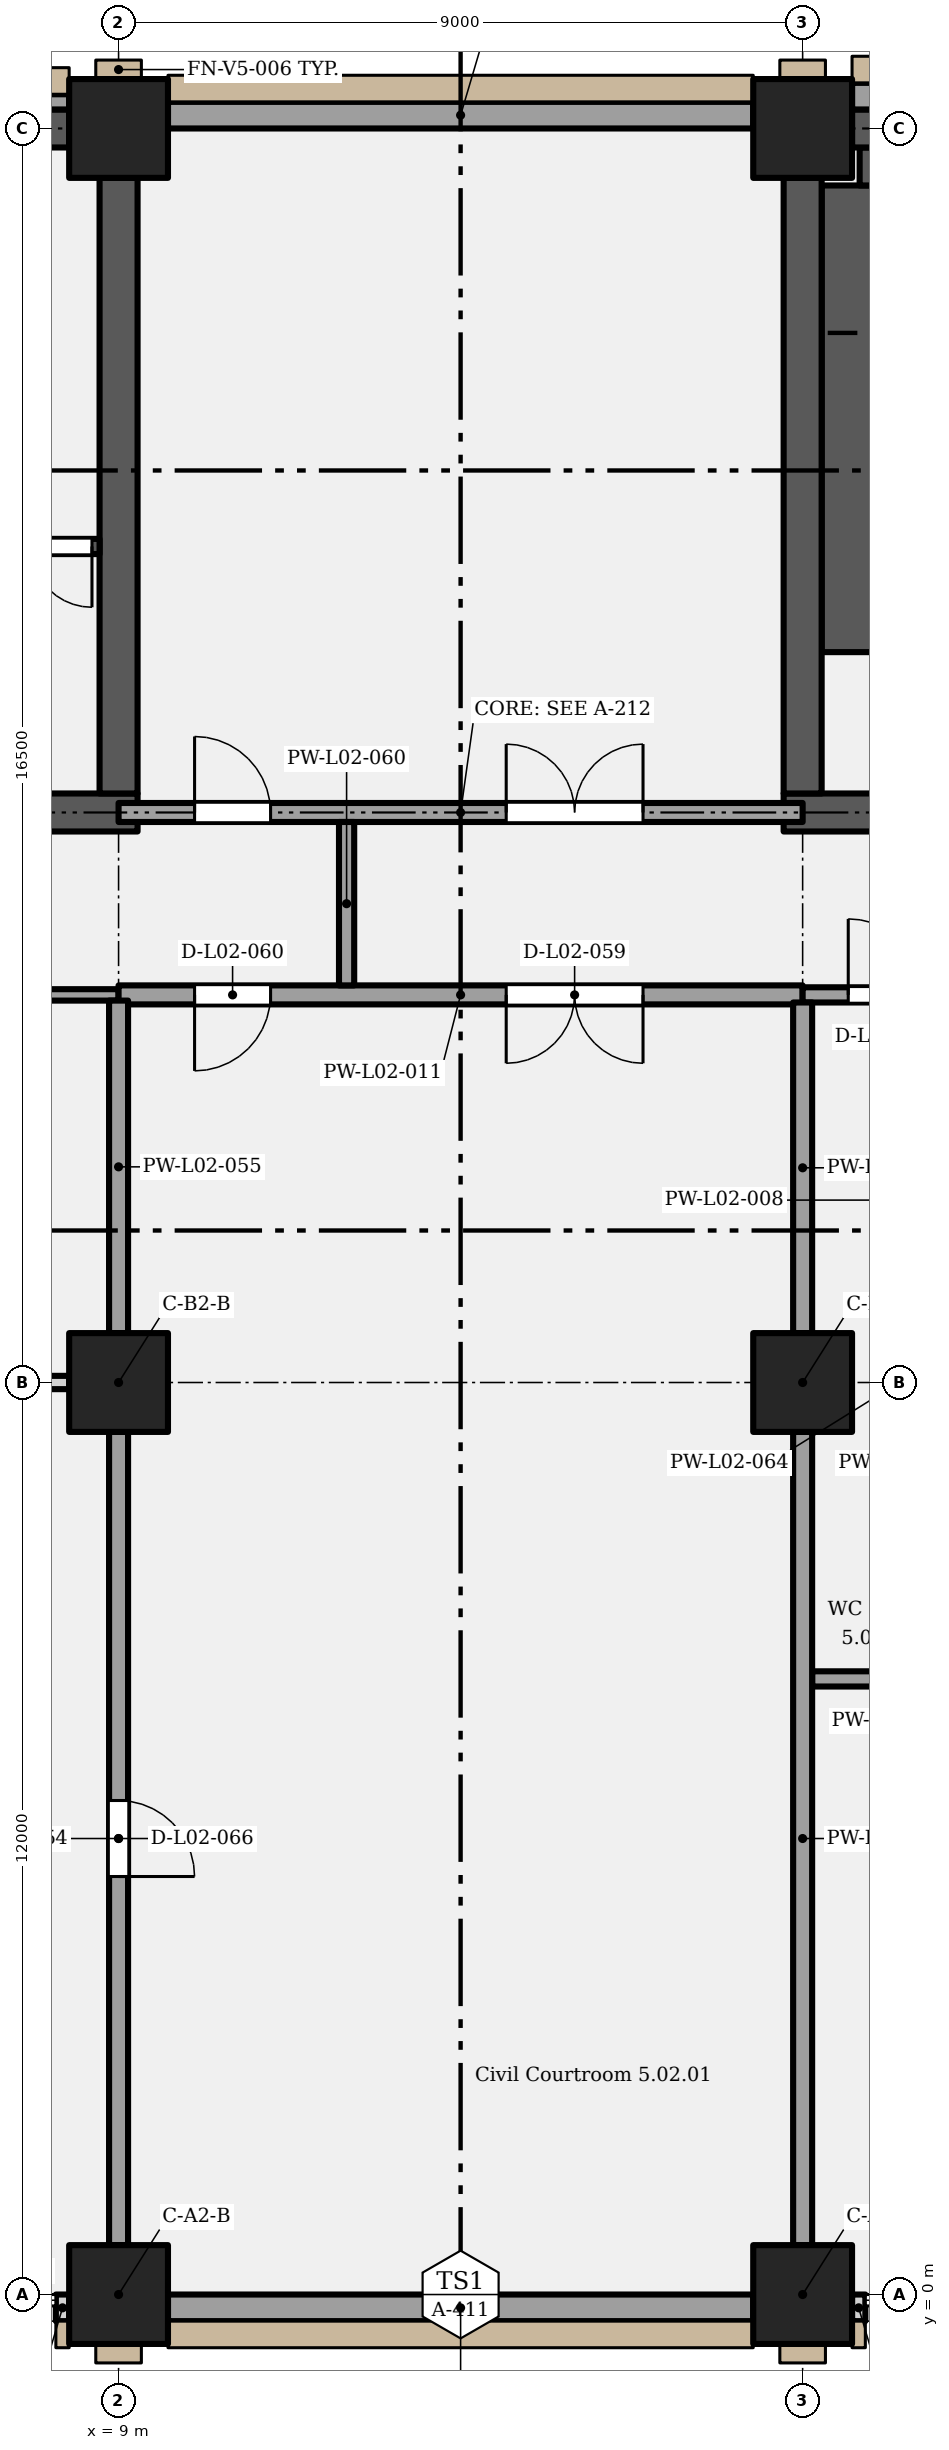
"""IFC4 building model, lengths in metres.
Left out: names, types, materials, properties, quantities, classifications, styles, units other than length and angle.
Written with IfcOpenShell. Run it as: python <this file> out.ifc"""

import sys

from ifc_helpers import new_model, si_unit, direction, frame, frame_2d, origin, origin_2d, place, context, subcontext, project, spatial, rectangle, extrude, element, fill, save


model = new_model("IFC4")
c1 = context("Model", 3, precision=1e-05, world=origin(), true_north=direction((0.0, 1.0)))
c2 = subcontext(c1, "Body", "Model", "MODEL_VIEW")
j1 = project(units=[si_unit("LENGTHUNIT", "METRE"), si_unit("PLANEANGLEUNIT", "RADIAN")], contexts=[c1])
p1 = place(None, origin())
s1 = spatial("IfcSite", under=j1, at=p1, CompositionType="ELEMENT")
p2 = place(p1, origin())
s2 = spatial("IfcBuilding", under=s1, at=p2, CompositionType="ELEMENT")
p3 = place(p2, frame((0.0, 0.0, 12.0)))
s3 = spatial("IfcBuildingStorey", under=s2, at=p3, CompositionType="ELEMENT", Elevation=12.0)
for number, where, z_axis, x_axis in (
    (1, (9.0, 0.0, 0.0), (0.0, 0.0, 1.0), (1.0, 0.0, 0.0)),
    (2, (18.0, 0.0, 0.0), (0.0, 0.0, 1.0), (1.0, 0.0, 0.0)),
    (3, (9.0, 12.0, 0.0), (0.0, 0.0, 1.0), (1.0, 0.0, 0.0)),
    (4, (18.0, 12.0, 0.0), (0.0, 0.0, 1.0), (1.0, 0.0, 0.0)),
    (5, (9.0, 28.5, 0.0), (0.0, 0.0, 1.0), (1.0, 0.0, 0.0)),
    (6, (18.0, 28.5, 0.0), (0.0, 0.0, 1.0), (1.0, 0.0, 0.0)),
):
    element("IfcColumn", number, at=place(p3, frame(where, z_axis=z_axis, x_axis=x_axis)), inside=s3, PredefinedType="COLUMN", context=c2, shape_type="SweptSolid", body=[
        extrude(rectangle(XDim=1.3, YDim=1.3, at=origin_2d()), origin(), (0.0, 0.0, 1.0), 5.4),
    ])
p4 = place(p3, frame((-0.25, 19.5, 0.0), z_axis=(0.0, 0.0, 1.0), x_axis=(1.0, 0.0, 0.0)))
e7 = element("IfcWall", 7, at=p4, inside=s3, PredefinedType="SHEAR", context=c2, shape_type="SweptSolid", body=[
    extrude(rectangle(XDim=9.5, YDim=0.5, at=frame_2d((4.75, 0.0))), origin(), (0.0, 0.0, 1.0), 5.15),
])
p5 = place(p4, frame((1.9, 0.0, 0.0)))
e8 = element("IfcOpeningElement", 8, at=p5, cuts=e7, PredefinedType="OPENING", context=c2, shape_type="SweptSolid", body=[
    extrude(rectangle(XDim=1.2, YDim=2.1, at=frame_2d((0.6, 1.05))), frame((0.0, 0.26, 0.0), z_axis=(0.0, -1.0, 0.0), x_axis=(1.0, 0.0, 0.0)), (0.0, 0.0, 1.0), 0.52),
])
p6 = place(p4, frame((6.4, 0.0, 0.0)))
e9 = element("IfcOpeningElement", 9, at=p6, cuts=e7, PredefinedType="OPENING", context=c2, shape_type="SweptSolid", body=[
    extrude(rectangle(XDim=1.2, YDim=2.1, at=frame_2d((0.6, 1.05))), frame((0.0, 0.26, 0.0), z_axis=(0.0, -1.0, 0.0), x_axis=(1.0, 0.0, 0.0)), (0.0, 0.0, 1.0), 0.52),
])
p7 = place(p3, frame((17.75, 19.5, 0.0), z_axis=(0.0, 0.0, 1.0), x_axis=(1.0, 0.0, 0.0)))
e10 = element("IfcWall", 10, at=p7, inside=s3, PredefinedType="SHEAR", context=c2, shape_type="SweptSolid", body=[
    extrude(rectangle(XDim=9.5, YDim=0.5, at=frame_2d((4.75, 0.0))), origin(), (0.0, 0.0, 1.0), 5.15),
])
p8 = place(p7, frame((1.9, 0.0, 0.0)))
e11 = element("IfcOpeningElement", 11, at=p8, cuts=e10, PredefinedType="OPENING", context=c2, shape_type="SweptSolid", body=[
    extrude(rectangle(XDim=1.2, YDim=2.1, at=frame_2d((0.6, 1.05))), frame((0.0, 0.26, 0.0), z_axis=(0.0, -1.0, 0.0), x_axis=(1.0, 0.0, 0.0)), (0.0, 0.0, 1.0), 0.52),
])
p9 = place(p7, frame((7.95, 0.0, 0.0), z_axis=(0.0, 0.0, 1.0), x_axis=(-1.0, 0.0, 0.0)))
e12 = element("IfcOpeningElement", 12, at=p9, cuts=e10, PredefinedType="OPENING", context=c2, shape_type="SweptSolid", body=[
    extrude(rectangle(XDim=1.8, YDim=2.1, at=frame_2d((0.9, 1.05))), frame((0.0, 0.26, 0.0), z_axis=(0.0, -1.0, 0.0), x_axis=(1.0, 0.0, 0.0)), (0.0, 0.0, 1.0), 0.52),
])
for number, where, z_axis, x_axis in (
    (13, (9.0, 19.75, 0.0), (0.0, 0.0, 1.0), (0.0, 1.0, 0.0)),
    (14, (18.0, 19.75, 0.0), (0.0, 0.0, 1.0), (0.0, 1.0, 0.0)),
):
    element("IfcWall", number, at=place(p3, frame(where, z_axis=z_axis, x_axis=x_axis)), inside=s3, PredefinedType="SHEAR", context=c2, shape_type="SweptSolid", body=[
        extrude(rectangle(XDim=8.1, YDim=0.5, at=frame_2d((4.05, 0.0))), origin(), (0.0, 0.0, 1.0), 5.15),
    ])
p10 = place(p3, frame((0.45, 28.5, 0.0), z_axis=(0.0, 0.0, 1.0), x_axis=(1.0, 0.0, 0.0)))
e15 = element("IfcWall", 15, at=p10, inside=s3, PredefinedType="SHEAR", context=c2, shape_type="SweptSolid", body=[
    extrude(rectangle(XDim=7.9, YDim=0.5, at=frame_2d((3.95, 0.0))), origin(), (0.0, 0.0, 1.0), 5.15),
])
p11 = place(p3, frame((18.65, 28.5, 0.0), z_axis=(0.0, 0.0, 1.0), x_axis=(1.0, 0.0, 0.0)))
e16 = element("IfcWall", 16, at=p11, inside=s3, PredefinedType="SHEAR", context=c2, shape_type="SweptSolid", body=[
    extrude(rectangle(XDim=7.7, YDim=0.5, at=frame_2d((3.85, 0.0))), origin(), (0.0, 0.0, 1.0), 5.15),
])
p12 = place(p3, frame((8.175, -0.175, 0.0), z_axis=(0.0, 0.0, 1.0), x_axis=(1.0, 0.0, 0.0)))
e17 = element("IfcWall", 17, at=p12, inside=s3, PredefinedType="SOLIDWALL", context=c2, shape_type="SweptSolid", body=[
    extrude(rectangle(XDim=0.175, YDim=0.35, at=frame_2d((0.087, 0.0))), origin(), (0.0, 0.0, 1.0), 5.15),
])
p13 = place(p3, frame((9.65, -0.175, 0.0), z_axis=(0.0, 0.0, 1.0), x_axis=(1.0, 0.0, 0.0)))
e18 = element("IfcWall", 18, at=p13, inside=s3, PredefinedType="SOLIDWALL", context=c2, shape_type="SweptSolid", body=[
    extrude(rectangle(XDim=7.7, YDim=0.35, at=frame_2d((3.85, 0.0))), origin(), (0.0, 0.0, 1.0), 5.15),
])
p14 = place(p3, frame((18.65, -0.175, 0.0), z_axis=(0.0, 0.0, 1.0), x_axis=(1.0, 0.0, 0.0)))
e19 = element("IfcWall", 19, at=p14, inside=s3, PredefinedType="SOLIDWALL", context=c2, shape_type="SweptSolid", body=[
    extrude(rectangle(XDim=0.175, YDim=0.35, at=frame_2d((0.087, 0.0))), origin(), (0.0, 0.0, 1.0), 5.15),
])
p15 = place(p3, frame((0.45, 28.85, 0.0), z_axis=(0.0, 0.0, 1.0), x_axis=(1.0, 0.0, 0.0)))
e20 = element("IfcWall", 20, at=p15, inside=s3, PredefinedType="SOLIDWALL", context=c2, shape_type="SweptSolid", body=[
    extrude(rectangle(XDim=7.9, YDim=0.2, at=frame_2d((3.95, 0.0))), origin(), (0.0, 0.0, 1.0), 5.15),
])
for number, where, z_axis, x_axis in (
    (21, (9.65, 28.675, 0.0), (0.0, 0.0, 1.0), (1.0, 0.0, 0.0)),
    (22, (18.65, 28.925, 0.0), (0.0, 0.0, 1.0), (1.0, 0.0, 0.0)),
):
    element("IfcWall", number, at=place(p3, frame(where, z_axis=z_axis, x_axis=x_axis)), inside=s3, PredefinedType="SOLIDWALL", context=c2, shape_type="SweptSolid", body=[
        extrude(rectangle(XDim=7.7, YDim=0.35, at=frame_2d((3.85, 0.0))), origin(), (0.0, 0.0, 1.0), 5.15),
    ])
p16 = place(p3, frame((18.125, 8.1, 0.0), z_axis=(0.0, 0.0, 1.0), x_axis=(1.0, 0.0, 0.0)))
e23 = element("IfcWall", 23, at=p16, inside=s3, PredefinedType="PARTITIONING", context=c2, shape_type="SweptSolid", body=[
    extrude(rectangle(XDim=2.075, YDim=0.2, at=frame_2d((1.038, 0.0))), origin(), (0.0, 0.0, 1.0), 5.15),
])
p17 = place(p3, frame((4.413, 12.0, 0.0), z_axis=(0.0, 0.0, 1.0), x_axis=(1.0, 0.0, 0.0)))
e24 = element("IfcWall", 24, at=p17, inside=s3, PredefinedType="PARTITIONING", context=c2, shape_type="SweptSolid", body=[
    extrude(rectangle(XDim=3.938, YDim=0.175, at=frame_2d((1.969, 0.0))), origin(), (0.0, 0.0, 1.0), 4.4),
])
p18 = place(p17, frame((1.837, 0.0, 0.0)))
e25 = element("IfcOpeningElement", 25, at=p18, cuts=e24, PredefinedType="OPENING", context=c2, shape_type="SweptSolid", body=[
    extrude(rectangle(XDim=1.0, YDim=2.1, at=frame_2d((0.5, 1.05))), frame((0.0, 0.097, 0.0), z_axis=(0.0, -1.0, 0.0), x_axis=(1.0, 0.0, 0.0)), (0.0, 0.0, 1.0), 0.195),
])
p19 = place(p3, frame((-0.25, 17.1, 0.0), z_axis=(0.0, 0.0, 1.0), x_axis=(1.0, 0.0, 0.0)))
e26 = element("IfcWall", 26, at=p19, inside=s3, PredefinedType="PARTITIONING", context=c2, shape_type="SweptSolid", body=[
    extrude(rectangle(XDim=9.25, YDim=0.15, at=frame_2d((4.625, 0.0))), origin(), (0.0, 0.0, 1.0), 5.15),
])
p20 = place(p19, frame((3.0, 0.0, 0.0), z_axis=(0.0, 0.0, 1.0), x_axis=(-1.0, 0.0, 0.0)))
e27 = element("IfcOpeningElement", 27, at=p20, cuts=e26, PredefinedType="OPENING", context=c2, shape_type="SweptSolid", body=[
    extrude(rectangle(XDim=1.0, YDim=2.1, at=frame_2d((0.5, 1.05))), frame((0.0, 0.085, 0.0), z_axis=(0.0, -1.0, 0.0), x_axis=(1.0, 0.0, 0.0)), (0.0, 0.0, 1.0), 0.17),
])
p21 = place(p19, frame((7.5, 0.0, 0.0), z_axis=(0.0, 0.0, 1.0), x_axis=(-1.0, 0.0, 0.0)))
e28 = element("IfcOpeningElement", 28, at=p21, cuts=e26, PredefinedType="OPENING", context=c2, shape_type="SweptSolid", body=[
    extrude(rectangle(XDim=1.0, YDim=2.1, at=frame_2d((0.5, 1.05))), frame((0.0, 0.085, 0.0), z_axis=(0.0, -1.0, 0.0), x_axis=(1.0, 0.0, 0.0)), (0.0, 0.0, 1.0), 0.17),
])
p22 = place(p3, frame((9.0, 17.1, 0.0), z_axis=(0.0, 0.0, 1.0), x_axis=(1.0, 0.0, 0.0)))
e29 = element("IfcWall", 29, at=p22, inside=s3, PredefinedType="PARTITIONING", context=c2, shape_type="SweptSolid", body=[
    extrude(rectangle(XDim=9.0, YDim=0.25, at=frame_2d((4.5, 0.0))), origin(), (0.0, 0.0, 1.0), 5.15),
])
p23 = place(p22, frame((6.9, 0.0, 0.0), z_axis=(0.0, 0.0, 1.0), x_axis=(-1.0, 0.0, 0.0)))
e30 = element("IfcOpeningElement", 30, at=p23, cuts=e29, PredefinedType="OPENING", context=c2, shape_type="SweptSolid", body=[
    extrude(rectangle(XDim=1.8, YDim=2.4, at=frame_2d((0.9, 1.2))), frame((0.0, 0.135, 0.0), z_axis=(0.0, -1.0, 0.0), x_axis=(1.0, 0.0, 0.0)), (0.0, 0.0, 1.0), 0.27),
])
p24 = place(p22, frame((2.0, 0.0, 0.0), z_axis=(0.0, 0.0, 1.0), x_axis=(-1.0, 0.0, 0.0)))
e31 = element("IfcOpeningElement", 31, at=p24, cuts=e29, PredefinedType="OPENING", context=c2, shape_type="SweptSolid", body=[
    extrude(rectangle(XDim=1.0, YDim=2.1, at=frame_2d((0.5, 1.05))), frame((0.0, 0.135, 0.0), z_axis=(0.0, -1.0, 0.0), x_axis=(1.0, 0.0, 0.0)), (0.0, 0.0, 1.0), 0.27),
])
p25 = place(p3, frame((18.0, 17.1, 0.0), z_axis=(0.0, 0.0, 1.0), x_axis=(1.0, 0.0, 0.0)))
e32 = element("IfcWall", 32, at=p25, inside=s3, PredefinedType="PARTITIONING", context=c2, shape_type="SweptSolid", body=[
    extrude(rectangle(XDim=9.25, YDim=0.2, at=frame_2d((4.625, 0.0))), origin(), (0.0, 0.0, 1.0), 5.15),
])
p26 = place(p25, frame((7.25, 0.0, 0.0), z_axis=(0.0, 0.0, 1.0), x_axis=(-1.0, 0.0, 0.0)))
e33 = element("IfcOpeningElement", 33, at=p26, cuts=e32, PredefinedType="OPENING", context=c2, shape_type="SweptSolid", body=[
    extrude(rectangle(XDim=1.0, YDim=2.1, at=frame_2d((0.5, 1.05))), frame((0.0, 0.11, 0.0), z_axis=(0.0, -1.0, 0.0), x_axis=(1.0, 0.0, 0.0)), (0.0, 0.0, 1.0), 0.22),
])
p27 = place(p25, frame((0.6, 0.0, 0.0)))
e34 = element("IfcOpeningElement", 34, at=p27, cuts=e32, PredefinedType="OPENING", context=c2, shape_type="SweptSolid", body=[
    extrude(rectangle(XDim=1.0, YDim=2.1, at=frame_2d((0.5, 1.05))), frame((0.0, 0.11, 0.0), z_axis=(0.0, -1.0, 0.0), x_axis=(1.0, 0.0, 0.0)), (0.0, 0.0, 1.0), 0.22),
])
p28 = place(p3, frame((9.0, 19.5, 0.0), z_axis=(0.0, 0.0, 1.0), x_axis=(1.0, 0.0, 0.0)))
e35 = element("IfcWall", 35, at=p28, inside=s3, PredefinedType="PARTITIONING", context=c2, shape_type="SweptSolid", body=[
    extrude(rectangle(XDim=9.0, YDim=0.25, at=frame_2d((4.5, 0.0))), origin(), (0.0, 0.0, 1.0), 5.15),
])
p29 = place(p28, frame((5.1, 0.0, 0.0)))
e36 = element("IfcOpeningElement", 36, at=p29, cuts=e35, PredefinedType="OPENING", context=c2, shape_type="SweptSolid", body=[
    extrude(rectangle(XDim=1.8, YDim=2.4, at=frame_2d((0.9, 1.2))), frame((0.0, 0.135, 0.0), z_axis=(0.0, -1.0, 0.0), x_axis=(1.0, 0.0, 0.0)), (0.0, 0.0, 1.0), 0.27),
])
p30 = place(p28, frame((1.0, 0.0, 0.0)))
e37 = element("IfcOpeningElement", 37, at=p30, cuts=e35, PredefinedType="OPENING", context=c2, shape_type="SweptSolid", body=[
    extrude(rectangle(XDim=1.0, YDim=2.1, at=frame_2d((0.5, 1.05))), frame((0.0, 0.135, 0.0), z_axis=(0.0, -1.0, 0.0), x_axis=(1.0, 0.0, 0.0)), (0.0, 0.0, 1.0), 0.27),
])
p31 = place(p3, frame((7.5, 23.0, 0.0), z_axis=(0.0, 0.0, 1.0), x_axis=(1.0, 0.0, 0.0)))
e38 = element("IfcWall", 38, at=p31, inside=s3, PredefinedType="SHEAR", context=c2, shape_type="SweptSolid", body=[
    extrude(rectangle(XDim=1.25, YDim=0.2, at=frame_2d((0.625, 0.0))), origin(), (0.0, 0.0, 1.0), 5.15),
])
p32 = place(p31, frame((1.15, 0.0, 0.0), z_axis=(0.0, 0.0, 1.0), x_axis=(-1.0, 0.0, 0.0)))
e39 = element("IfcOpeningElement", 39, at=p32, cuts=e38, PredefinedType="OPENING", context=c2, shape_type="SweptSolid", body=[
    extrude(rectangle(XDim=0.8, YDim=2.0, at=frame_2d((0.4, 1.0))), frame((0.0, 0.11, 0.0), z_axis=(0.0, -1.0, 0.0), x_axis=(1.0, 0.0, 0.0)), (0.0, 0.0, 1.0), 0.22),
])
p33 = place(p3, frame((9.0, 0.65, 0.0), z_axis=(0.0, 0.0, 1.0), x_axis=(0.0, 1.0, 0.0)))
e40 = element("IfcWall", 40, at=p33, inside=s3, PredefinedType="PARTITIONING", context=c2, shape_type="SweptSolid", body=[
    extrude(rectangle(XDim=10.7, YDim=0.25, at=frame_2d((5.35, 0.0))), origin(), (0.0, 0.0, 1.0), 4.4),
])
p34 = place(p33, frame((5.85, 0.0, 0.0), z_axis=(0.0, 0.0, 1.0), x_axis=(-1.0, 0.0, 0.0)))
e41 = element("IfcOpeningElement", 41, at=p34, cuts=e40, PredefinedType="OPENING", context=c2, shape_type="SweptSolid", body=[
    extrude(rectangle(XDim=1.0, YDim=2.1, at=frame_2d((0.5, 1.05))), frame((0.0, 0.135, 0.0), z_axis=(0.0, -1.0, 0.0), x_axis=(1.0, 0.0, 0.0)), (0.0, 0.0, 1.0), 0.27),
])
p35 = place(p3, frame((9.0, 12.65, 0.0), z_axis=(0.0, 0.0, 1.0), x_axis=(0.0, 1.0, 0.0)))
e42 = element("IfcWall", 42, at=p35, inside=s3, PredefinedType="PARTITIONING", context=c2, shape_type="SweptSolid", body=[
    extrude(rectangle(XDim=4.375, YDim=0.25, at=frame_2d((2.188, 0.0))), origin(), (0.0, 0.0, 1.0), 4.2),
])
p36 = place(p3, frame((12.0, 17.225, 0.0), z_axis=(0.0, 0.0, 1.0), x_axis=(0.0, 1.0, 0.0)))
e43 = element("IfcWall", 43, at=p36, inside=s3, PredefinedType="PARTITIONING", context=c2, shape_type="SweptSolid", body=[
    extrude(rectangle(XDim=2.15, YDim=0.2, at=frame_2d((1.075, 0.0))), origin(), (0.0, 0.0, 1.0), 5.15),
])
p37 = place(p3, frame((18.0, 0.65, 0.0), z_axis=(0.0, 0.0, 1.0), x_axis=(0.0, 1.0, 0.0)))
e44 = element("IfcWall", 44, at=p37, inside=s3, PredefinedType="PARTITIONING", context=c2, shape_type="SweptSolid", body=[
    extrude(rectangle(XDim=10.7, YDim=0.25, at=frame_2d((5.35, 0.0))), origin(), (0.0, 0.0, 1.0), 4.4),
])
p38 = place(p3, frame((18.0, 12.65, 0.0), z_axis=(0.0, 0.0, 1.0), x_axis=(0.0, 1.0, 0.0)))
e45 = element("IfcWall", 45, at=p38, inside=s3, PredefinedType="PARTITIONING", context=c2, shape_type="SweptSolid", body=[
    extrude(rectangle(XDim=4.35, YDim=0.25, at=frame_2d((2.175, 0.0))), origin(), (0.0, 0.0, 1.0), 4.2),
])
p39 = place(p3, frame((18.6, 21.61, 0.0), z_axis=(0.0, 0.0, 1.0), x_axis=(0.0, 1.0, 0.0)))
e46 = element("IfcWall", 46, at=p39, inside=s3, PredefinedType="SHEAR", context=c2, shape_type="SweptSolid", body=[
    extrude(rectangle(XDim=6.14, YDim=0.7, at=frame_2d((3.07, 0.0))), origin(), (0.0, 0.0, 1.0), 2.587),
])
p40 = place(p3, frame((18.85, 27.75, 0.0), z_axis=(0.0, 0.0, 1.0), x_axis=(0.0, 1.0, 0.0)))
e47 = element("IfcWall", 47, at=p40, inside=s3, PredefinedType="SHEAR", context=c2, shape_type="SweptSolid", body=[
    extrude(rectangle(XDim=0.5, YDim=0.2, at=frame_2d((0.25, 0.0))), origin(), (0.0, 0.0, 1.0), 2.587),
])
p41 = place(p32, origin())
e48 = element("IfcDoor", 48, at=p41, inside=s3, OperationType="SINGLE_SWING_LEFT", PredefinedType="DOOR", context=c2, shape_type="SweptSolid", body=[
    extrude(rectangle(XDim=0.8, YDim=2.0, at=frame_2d((0.4, 1.0))), frame((0.0, 0.025, 0.0), z_axis=(0.0, -1.0, 0.0), x_axis=(1.0, 0.0, 0.0)), (0.0, 0.0, 1.0), 0.05),
])
fill(e39, e48)
p42 = place(p23, origin())
e49 = element("IfcDoor", 49, at=p42, inside=s3, OperationType="DOUBLE_DOOR_SINGLE_SWING", PredefinedType="DOOR", context=c2, shape_type="SweptSolid", body=[
    extrude(rectangle(XDim=1.8, YDim=2.4, at=frame_2d((0.9, 1.2))), frame((0.0, 0.025, 0.0), z_axis=(0.0, -1.0, 0.0), x_axis=(1.0, 0.0, 0.0)), (0.0, 0.0, 1.0), 0.05),
])
fill(e30, e49)
p43 = place(p24, origin())
e50 = element("IfcDoor", 50, at=p43, inside=s3, OperationType="SINGLE_SWING_RIGHT", PredefinedType="DOOR", context=c2, shape_type="SweptSolid", body=[
    extrude(rectangle(XDim=1.0, YDim=2.1, at=frame_2d((0.5, 1.05))), frame((0.0, 0.025, 0.0), z_axis=(0.0, -1.0, 0.0), x_axis=(1.0, 0.0, 0.0)), (0.0, 0.0, 1.0), 0.05),
])
fill(e31, e50)
p44 = place(p29, origin())
e51 = element("IfcDoor", 51, at=p44, inside=s3, OperationType="DOUBLE_DOOR_SINGLE_SWING", PredefinedType="DOOR", context=c2, shape_type="SweptSolid", body=[
    extrude(rectangle(XDim=1.8, YDim=2.4, at=frame_2d((0.9, 1.2))), frame((0.0, 0.025, 0.0), z_axis=(0.0, -1.0, 0.0), x_axis=(1.0, 0.0, 0.0)), (0.0, 0.0, 1.0), 0.05),
])
fill(e36, e51)
p45 = place(p30, origin())
e52 = element("IfcDoor", 52, at=p45, inside=s3, OperationType="SINGLE_SWING_LEFT", PredefinedType="DOOR", context=c2, shape_type="SweptSolid", body=[
    extrude(rectangle(XDim=1.0, YDim=2.1, at=frame_2d((0.5, 1.05))), frame((0.0, 0.025, 0.0), z_axis=(0.0, -1.0, 0.0), x_axis=(1.0, 0.0, 0.0)), (0.0, 0.0, 1.0), 0.05),
])
fill(e37, e52)
p46 = place(p34, origin())
e53 = element("IfcDoor", 53, at=p46, inside=s3, OperationType="SINGLE_SWING_RIGHT", PredefinedType="DOOR", context=c2, shape_type="SweptSolid", body=[
    extrude(rectangle(XDim=1.0, YDim=2.1, at=frame_2d((0.5, 1.05))), frame((0.0, 0.025, 0.0), z_axis=(0.0, -1.0, 0.0), x_axis=(1.0, 0.0, 0.0)), (0.0, 0.0, 1.0), 0.05),
])
fill(e41, e53)
p47 = place(p27, origin())
e54 = element("IfcDoor", 54, at=p47, inside=s3, OperationType="SINGLE_SWING_LEFT", PredefinedType="DOOR", context=c2, shape_type="SweptSolid", body=[
    extrude(rectangle(XDim=1.0, YDim=2.1, at=frame_2d((0.5, 1.05))), frame((0.0, 0.025, 0.0), z_axis=(0.0, -1.0, 0.0), x_axis=(1.0, 0.0, 0.0)), (0.0, 0.0, 1.0), 0.05),
])
fill(e34, e54)
save(model, sys.argv[1])
